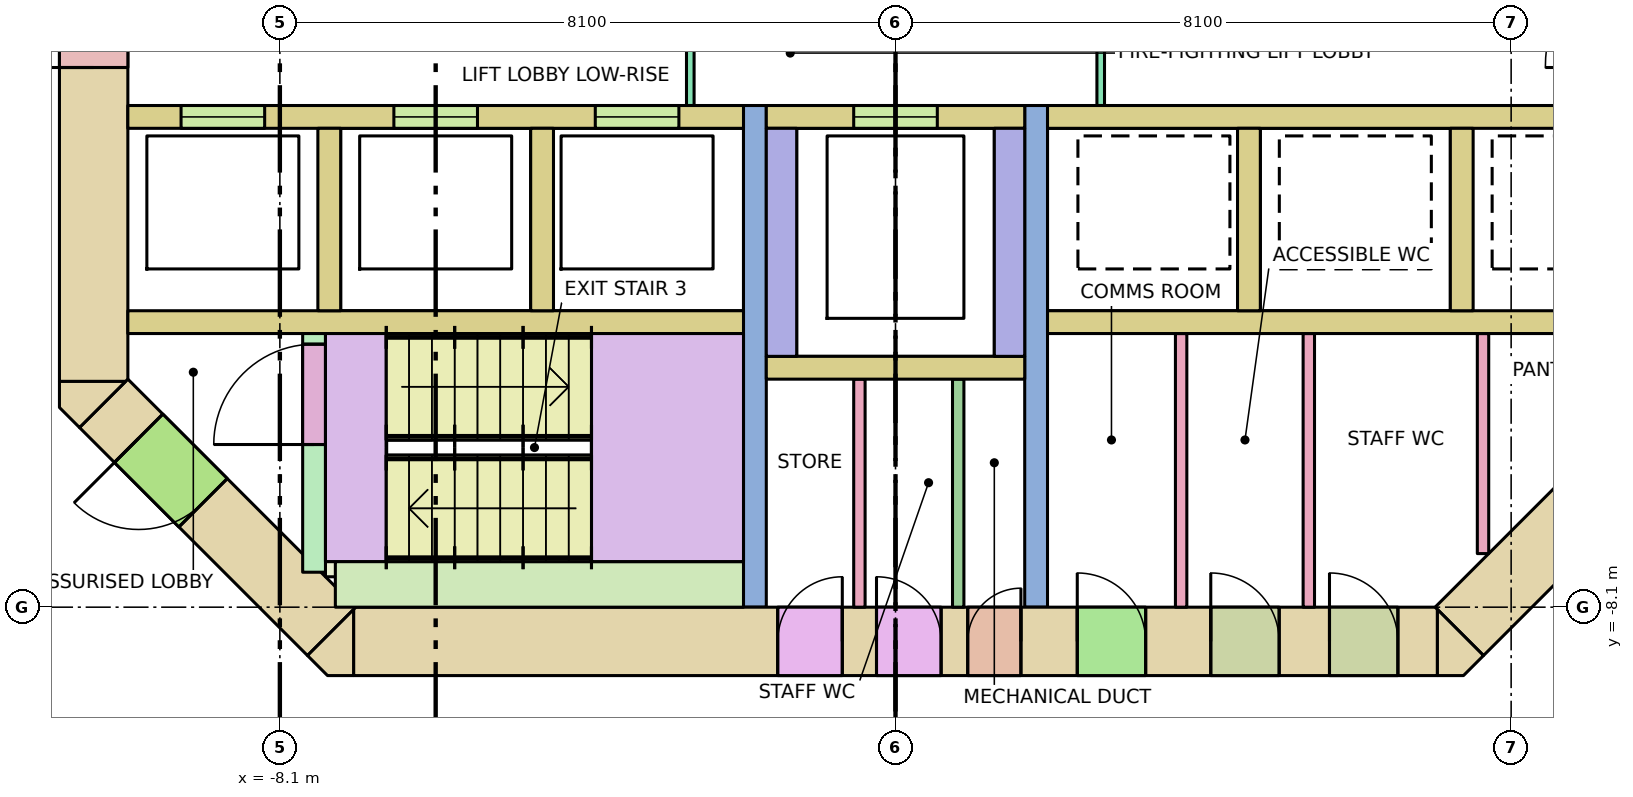
"""IFC4 building model, lengths in metres.
Left out: names, types, materials, properties, quantities, classifications, styles, units other than length and angle.
Written with IfcOpenShell. Run it as: python <this file> out.ifc"""

import sys

from ifc_helpers import new_model, si_unit, direction, frame, frame_2d, origin, place, context, subcontext, project, spatial, polyline, rectangle, outline, extrude, element, fill, save


model = new_model("IFC4")
c1 = context("Model", 3, precision=1e-05, world=origin(), true_north=direction((0.0, 1.0)))
c2 = subcontext(c1, "Body", "Model", "MODEL_VIEW")
j1 = project(units=[si_unit("LENGTHUNIT", "METRE"), si_unit("PLANEANGLEUNIT", "RADIAN")], contexts=[c1])
p1 = place(None, origin())
s1 = spatial("IfcSite", under=j1, at=p1, CompositionType="ELEMENT")
p2 = place(p1, origin())
s2 = spatial("IfcBuilding", under=s1, at=p2, CompositionType="ELEMENT")
p3 = place(p2, frame((0.0, 0.0, 20.0)))
s3 = spatial("IfcBuildingStorey", under=s2, at=p3, CompositionType="ELEMENT", Elevation=20.0)
p4 = place(p3, frame((-7.13, -8.55, -0.32), z_axis=(0.0, 0.0, 1.0), x_axis=(1.0, 0.0, 0.0)))
e1 = element("IfcWall", 1, at=p4, inside=s3, PredefinedType="SHEAR", context=c2, shape_type="SweptSolid", body=[
    extrude(rectangle(XDim=14.26, YDim=0.9, at=frame_2d((7.13, 0.0))), origin(), (0.0, 0.0, 1.0), 7.04),
])
p5 = place(p4, frame((8.08, 0.0, 0.32)))
e2 = element("IfcOpeningElement", 2, at=p5, cuts=e1, PredefinedType="OPENING", context=c2, shape_type="SweptSolid", body=[
    extrude(rectangle(XDim=0.7, YDim=2.1, at=frame_2d((0.35, 1.05))), frame((0.0, 0.46, 0.0), z_axis=(0.0, -1.0, 0.0), x_axis=(1.0, 0.0, 0.0)), (0.0, 0.0, 1.0), 0.92),
])
p6 = place(p4, frame((5.58, 0.0, 0.32)))
e3 = element("IfcOpeningElement", 3, at=p6, cuts=e1, PredefinedType="OPENING", context=c2, shape_type="SweptSolid", body=[
    extrude(rectangle(XDim=0.85, YDim=2.1, at=frame_2d((0.425, 1.05))), frame((0.0, 0.46, 0.0), z_axis=(0.0, -1.0, 0.0), x_axis=(1.0, 0.0, 0.0)), (0.0, 0.0, 1.0), 0.92),
])
p7 = place(p4, frame((6.88, 0.0, 0.32)))
e4 = element("IfcOpeningElement", 4, at=p7, cuts=e1, PredefinedType="OPENING", context=c2, shape_type="SweptSolid", body=[
    extrude(rectangle(XDim=0.85, YDim=2.1, at=frame_2d((0.425, 1.05))), frame((0.0, 0.46, 0.0), z_axis=(0.0, -1.0, 0.0), x_axis=(1.0, 0.0, 0.0)), (0.0, 0.0, 1.0), 0.92),
])
p8 = place(p4, frame((9.521, 0.0, 0.32)))
e5 = element("IfcOpeningElement", 5, at=p8, cuts=e1, PredefinedType="OPENING", context=c2, shape_type="SweptSolid", body=[
    extrude(rectangle(XDim=0.9, YDim=2.1, at=frame_2d((0.45, 1.05))), frame((0.0, 0.46, 0.0), z_axis=(0.0, -1.0, 0.0), x_axis=(1.0, 0.0, 0.0)), (0.0, 0.0, 1.0), 0.92),
])
p9 = place(p4, frame((11.278, 0.0, 0.32)))
e6 = element("IfcOpeningElement", 6, at=p9, cuts=e1, PredefinedType="OPENING", context=c2, shape_type="SweptSolid", body=[
    extrude(rectangle(XDim=0.9, YDim=2.1, at=frame_2d((0.45, 1.05))), frame((0.0, 0.46, 0.0), z_axis=(0.0, -1.0, 0.0), x_axis=(1.0, 0.0, 0.0)), (0.0, 0.0, 1.0), 0.92),
])
p10 = place(p4, frame((12.84, 0.0, 0.32)))
e7 = element("IfcOpeningElement", 7, at=p10, cuts=e1, PredefinedType="OPENING", context=c2, shape_type="SweptSolid", body=[
    extrude(rectangle(XDim=0.9, YDim=2.1, at=frame_2d((0.45, 1.05))), frame((0.0, 0.46, 0.0), z_axis=(0.0, -1.0, 0.0), x_axis=(1.0, 0.0, 0.0)), (0.0, 0.0, 1.0), 0.92),
])
p11 = place(p3, frame((-10.55, -5.13, -0.32), z_axis=(0.0, 0.0, 1.0), x_axis=(0.0, 1.0, 0.0)))
e8 = element("IfcWall", 8, at=p11, inside=s3, PredefinedType="SHEAR", context=c2, shape_type="SweptSolid", body=[
    extrude(rectangle(XDim=10.26, YDim=0.9, at=frame_2d((5.13, 0.0))), origin(), (0.0, 0.0, 1.0), 7.04),
])
p12 = place(p11, frame((4.13, 0.0, 0.32)))
e9 = element("IfcOpeningElement", 9, at=p12, cuts=e8, PredefinedType="OPENING", context=c2, shape_type="SweptSolid", body=[
    extrude(rectangle(XDim=2.0, YDim=2.1, at=frame_2d((1.0, 1.05))), frame((0.0, 0.46, 0.0), z_axis=(0.0, -1.0, 0.0), x_axis=(1.0, 0.0, 0.0)), (0.0, 0.0, 1.0), 0.92),
])
p13 = place(p3, frame((10.418, -5.418, -0.32), z_axis=(0.0, 0.0, 1.0), x_axis=(-0.707106781187, -0.707106781187, 0.0)))
e10 = element("IfcWall", 10, at=p13, inside=s3, PredefinedType="SHEAR", context=c2, shape_type="SweptSolid", body=[
    extrude(rectangle(XDim=4.243, YDim=0.9, at=frame_2d((2.121, 0.0))), origin(), (0.0, 0.0, 1.0), 7.04),
])
p14 = place(p13, frame((0.52, 0.0, 0.32)))
e11 = element("IfcOpeningElement", 11, at=p14, cuts=e10, PredefinedType="OPENING", context=c2, shape_type="SweptSolid", body=[
    extrude(rectangle(XDim=0.9, YDim=2.1, at=frame_2d((0.45, 1.05))), frame((0.0, 0.46, 0.0), z_axis=(0.0, -1.0, 0.0), x_axis=(1.0, 0.0, 0.0)), (0.0, 0.0, 1.0), 0.92),
])
p15 = place(p3, frame((-7.418, -8.418, -0.32), z_axis=(0.0, 0.0, 1.0), x_axis=(-0.707106781187, 0.707106781187, 0.0)))
e12 = element("IfcWall", 12, at=p15, inside=s3, PredefinedType="SHEAR", context=c2, shape_type="SweptSolid", body=[
    extrude(rectangle(XDim=4.243, YDim=0.9, at=frame_2d((2.121, 0.0))), origin(), (0.0, 0.0, 1.0), 7.04),
])
p16 = place(p15, frame((2.393, 0.0, 0.32)))
e13 = element("IfcOpeningElement", 13, at=p16, cuts=e12, PredefinedType="OPENING", context=c2, shape_type="SweptSolid", body=[
    extrude(rectangle(XDim=1.2, YDim=2.1, at=frame_2d((0.6, 1.05))), frame((0.0, 0.46, 0.0), z_axis=(0.0, -1.0, 0.0), x_axis=(1.0, 0.0, 0.0)), (0.0, 0.0, 1.0), 0.92),
])
p17 = place(p3, frame((0.0, 0.0, -0.32)))
e14 = element("IfcWall", 14, at=p17, inside=s3, PredefinedType="SHEAR", context=c2, shape_type="SweptSolid", body=[
    extrude(outline(polyline([(-7.473, -9.0), (-7.736, -8.736), (-7.13, -8.13), (-7.13, -9.0), (-7.473, -9.0)])), origin(), (0.0, 0.0, 1.0), 7.04),
])
p18 = place(p3, frame((0.0, 0.0, -0.32)))
e15 = element("IfcWall", 15, at=p18, inside=s3, PredefinedType="SHEAR", context=c2, shape_type="SweptSolid", body=[
    extrude(outline(polyline([(7.473, -9.0), (7.13, -9.0), (7.13, -8.13), (7.736, -8.736), (7.473, -9.0)])), origin(), (0.0, 0.0, 1.0), 7.04),
])
p19 = place(p3, frame((0.0, 0.0, -0.32)))
e16 = element("IfcWall", 16, at=p19, inside=s3, PredefinedType="SHEAR", context=c2, shape_type="SweptSolid", body=[
    extrude(outline(polyline([(-11.0, -5.473), (-11.0, -5.13), (-10.13, -5.13), (-10.736, -5.736), (-11.0, -5.473)])), origin(), (0.0, 0.0, 1.0), 7.04),
])
for number, where, z_axis, x_axis in (
    (17, (-10.1, -4.35, 0.0), (0.0, 0.0, 1.0), (1.0, 0.0, 0.0)),
    (18, (2.0, -4.35, 0.0), (0.0, 0.0, 1.0), (1.0, 0.0, 0.0)),
):
    element("IfcWall", number, at=place(p3, frame(where, z_axis=z_axis, x_axis=x_axis)), inside=s3, PredefinedType="SOLIDWALL", context=c2, shape_type="SweptSolid", body=[
        extrude(rectangle(XDim=8.1, YDim=0.3, at=frame_2d((4.05, 0.0))), origin(), (0.0, 0.0, 1.0), 6.72),
    ])
p20 = place(p3, frame((-10.1, -1.65, 0.0), z_axis=(0.0, 0.0, 1.0), x_axis=(1.0, 0.0, 0.0)))
e19 = element("IfcWall", 19, at=p20, inside=s3, PredefinedType="SOLIDWALL", context=c2, shape_type="SweptSolid", body=[
    extrude(rectangle(XDim=8.1, YDim=0.3, at=frame_2d((4.05, 0.0))), origin(), (0.0, 0.0, 1.0), 6.72),
])
p21 = place(p20, frame((0.7, 0.0, 0.0)))
e20 = element("IfcOpeningElement", 20, at=p21, cuts=e19, PredefinedType="OPENING", context=c2, shape_type="SweptSolid", body=[
    extrude(rectangle(XDim=1.1, YDim=2.1, at=frame_2d((0.55, 1.05))), frame((0.0, 0.16, 0.0), z_axis=(0.0, -1.0, 0.0), x_axis=(1.0, 0.0, 0.0)), (0.0, 0.0, 1.0), 0.32),
])
p22 = place(p20, frame((3.5, 0.0, 0.0)))
e21 = element("IfcOpeningElement", 21, at=p22, cuts=e19, PredefinedType="OPENING", context=c2, shape_type="SweptSolid", body=[
    extrude(rectangle(XDim=1.1, YDim=2.1, at=frame_2d((0.55, 1.05))), frame((0.0, 0.16, 0.0), z_axis=(0.0, -1.0, 0.0), x_axis=(1.0, 0.0, 0.0)), (0.0, 0.0, 1.0), 0.32),
])
p23 = place(p20, frame((6.15, 0.0, 0.0)))
e22 = element("IfcOpeningElement", 22, at=p23, cuts=e19, PredefinedType="OPENING", context=c2, shape_type="SweptSolid", body=[
    extrude(rectangle(XDim=1.1, YDim=2.1, at=frame_2d((0.55, 1.05))), frame((0.0, 0.16, 0.0), z_axis=(0.0, -1.0, 0.0), x_axis=(1.0, 0.0, 0.0)), (0.0, 0.0, 1.0), 0.32),
])
p24 = place(p3, frame((2.0, -1.65, 0.0), z_axis=(0.0, 0.0, 1.0), x_axis=(1.0, 0.0, 0.0)))
e23 = element("IfcWall", 23, at=p24, inside=s3, PredefinedType="SOLIDWALL", context=c2, shape_type="SweptSolid", body=[
    extrude(rectangle(XDim=8.1, YDim=0.3, at=frame_2d((4.05, 0.0))), origin(), (0.0, 0.0, 1.0), 6.72),
])
for number, where, z_axis, x_axis in (
    (24, (-7.45, -4.2, 0.0), (0.0, 0.0, 1.0), (0.0, 1.0, 0.0)),
    (25, (-4.65, -4.2, 0.0), (0.0, 0.0, 1.0), (0.0, 1.0, 0.0)),
    (26, (4.65, -4.2, 0.0), (0.0, 0.0, 1.0), (0.0, 1.0, 0.0)),
    (27, (7.45, -4.2, 0.0), (0.0, 0.0, 1.0), (0.0, 1.0, 0.0)),
):
    element("IfcWall", number, at=place(p3, frame(where, z_axis=z_axis, x_axis=x_axis)), inside=s3, PredefinedType="SOLIDWALL", context=c2, shape_type="SweptSolid", body=[
        extrude(rectangle(XDim=2.4, YDim=0.3, at=frame_2d((1.2, 0.0))), origin(), (0.0, 0.0, 1.0), 6.72),
    ])
for number, where, z_axis, x_axis in (
    (28, (-1.85, -8.1, 0.0), (0.0, 0.0, 1.0), (0.0, 1.0, 0.0)),
    (29, (1.85, -8.1, 0.0), (0.0, 0.0, 1.0), (0.0, 1.0, 0.0)),
):
    element("IfcWall", number, at=place(p3, frame(where, z_axis=z_axis, x_axis=x_axis)), inside=s3, PredefinedType="SHEAR", context=c2, shape_type="SweptSolid", body=[
        extrude(rectangle(XDim=6.6, YDim=0.3, at=frame_2d((3.3, 0.0))), origin(), (0.0, 0.0, 1.0), 6.72),
    ])
p25 = place(p3, frame((-1.7, -1.65, 0.0), z_axis=(0.0, 0.0, 1.0), x_axis=(1.0, 0.0, 0.0)))
e30 = element("IfcWall", 30, at=p25, inside=s3, PredefinedType="SOLIDWALL", context=c2, shape_type="SweptSolid", body=[
    extrude(rectangle(XDim=3.4, YDim=0.3, at=frame_2d((1.7, 0.0))), origin(), (0.0, 0.0, 1.0), 6.72),
])
p26 = place(p25, frame((1.15, 0.0, 0.0)))
e31 = element("IfcOpeningElement", 31, at=p26, cuts=e30, PredefinedType="OPENING", context=c2, shape_type="SweptSolid", body=[
    extrude(rectangle(XDim=1.1, YDim=2.1, at=frame_2d((0.55, 1.05))), frame((0.0, 0.16, 0.0), z_axis=(0.0, -1.0, 0.0), x_axis=(1.0, 0.0, 0.0)), (0.0, 0.0, 1.0), 0.32),
])
for number, where, z_axis, x_axis in (
    (32, (-1.5, -4.8, 0.0), (0.0, 0.0, 1.0), (0.0, 1.0, 0.0)),
    (33, (1.5, -4.8, 0.0), (0.0, 0.0, 1.0), (0.0, 1.0, 0.0)),
):
    element("IfcWall", number, at=place(p3, frame(where, z_axis=z_axis, x_axis=x_axis)), inside=s3, PredefinedType="SOLIDWALL", context=c2, shape_type="SweptSolid", body=[
        extrude(rectangle(XDim=3.0, YDim=0.4, at=frame_2d((1.5, 0.0))), origin(), (0.0, 0.0, 1.0), 6.72),
    ])
p27 = place(p3, frame((-1.7, -4.95, 0.0), z_axis=(0.0, 0.0, 1.0), x_axis=(1.0, 0.0, 0.0)))
e34 = element("IfcWall", 34, at=p27, inside=s3, PredefinedType="SOLIDWALL", context=c2, shape_type="SweptSolid", body=[
    extrude(rectangle(XDim=3.4, YDim=0.3, at=frame_2d((1.7, 0.0))), origin(), (0.0, 0.0, 1.0), 6.72),
])
p28 = place(p3, frame((-7.65, -7.64, 0.0), z_axis=(0.0, 0.0, 1.0), x_axis=(0.0, 1.0, 0.0)))
e35 = element("IfcWall", 35, at=p28, inside=s3, PredefinedType="SHEAR", context=c2, shape_type="SweptSolid", body=[
    extrude(rectangle(XDim=3.14, YDim=0.3, at=frame_2d((1.57, 0.0))), origin(), (0.0, 0.0, 1.0), 6.72),
])
p29 = place(p28, frame((1.68, 0.0, 0.0)))
e36 = element("IfcOpeningElement", 36, at=p29, cuts=e35, PredefinedType="OPENING", context=c2, shape_type="SweptSolid", body=[
    extrude(rectangle(XDim=1.32, YDim=2.1, at=frame_2d((0.66, 1.05))), frame((0.0, 0.16, 0.0), z_axis=(0.0, -1.0, 0.0), x_axis=(1.0, 0.0, 0.0)), (0.0, 0.0, 1.0), 0.32),
])
p30 = place(p3, frame((-7.5, -7.6, 0.0), z_axis=(0.0, 0.0, 1.0), x_axis=(1.0, 0.0, 0.0)))
e37 = element("IfcWall", 37, at=p30, inside=s3, PredefinedType="SHEAR", context=c2, shape_type="SweptSolid", body=[
    extrude(rectangle(XDim=0.6, YDim=0.2, at=frame_2d((0.3, 0.0))), origin(), (0.0, 0.0, 1.0), 6.72),
])
p31 = place(p3, frame((-7.37, -7.8, 0.0), z_axis=(0.0, 0.0, 1.0), x_axis=(1.0, 0.0, 0.0)))
e38 = element("IfcWall", 38, at=p31, inside=s3, PredefinedType="SHEAR", context=c2, shape_type="SweptSolid", body=[
    extrude(rectangle(XDim=5.37, YDim=0.6, at=frame_2d((2.685, 0.0))), origin(), (0.0, 0.0, 1.0), 6.72),
])
p32 = place(p3, frame((-2.7, -1.5, 0.0), z_axis=(0.0, 0.0, 1.0), x_axis=(0.0, 1.0, 0.0)))
e39 = element("IfcWall", 39, at=p32, inside=s3, PredefinedType="PARTITIONING", context=c2, shape_type="SweptSolid", body=[
    extrude(rectangle(XDim=3.0, YDim=0.1, at=frame_2d((1.5, 0.0))), origin(), (0.0, 0.0, 1.0), 6.72),
])
p33 = place(p32, frame((0.9, 0.0, 0.0)))
e40 = element("IfcOpeningElement", 40, at=p33, cuts=e39, PredefinedType="OPENING", context=c2, shape_type="SweptSolid", body=[
    extrude(rectangle(XDim=1.2, YDim=2.1, at=frame_2d((0.6, 1.05))), frame((0.0, 0.06, 0.0), z_axis=(0.0, -1.0, 0.0), x_axis=(1.0, 0.0, 0.0)), (0.0, 0.0, 1.0), 0.12),
])
p34 = place(p3, frame((2.7, -1.5, 0.0), z_axis=(0.0, 0.0, 1.0), x_axis=(0.0, 1.0, 0.0)))
e41 = element("IfcWall", 41, at=p34, inside=s3, PredefinedType="PARTITIONING", context=c2, shape_type="SweptSolid", body=[
    extrude(rectangle(XDim=3.0, YDim=0.1, at=frame_2d((1.5, 0.0))), origin(), (0.0, 0.0, 1.0), 6.72),
])
p35 = place(p34, frame((0.9, 0.0, 0.0)))
e42 = element("IfcOpeningElement", 42, at=p35, cuts=e41, PredefinedType="OPENING", context=c2, shape_type="SweptSolid", body=[
    extrude(rectangle(XDim=1.2, YDim=2.1, at=frame_2d((0.6, 1.05))), frame((0.0, 0.06, 0.0), z_axis=(0.0, -1.0, 0.0), x_axis=(1.0, 0.0, 0.0)), (0.0, 0.0, 1.0), 0.12),
])
for number, where, z_axis, x_axis in (
    (43, (0.825, -8.1, 0.0), (0.0, 0.0, 1.0), (0.0, 1.0, 0.0)),
    (44, (-0.475, -8.1, 0.0), (0.0, 0.0, 1.0), (0.0, 1.0, 0.0)),
):
    element("IfcWall", number, at=place(p3, frame(where, z_axis=z_axis, x_axis=x_axis)), inside=s3, PredefinedType="PARTITIONING", context=c2, shape_type="SweptSolid", body=[
        extrude(rectangle(XDim=3.0, YDim=0.15, at=frame_2d((1.5, 0.0))), origin(), (0.0, 0.0, 1.0), 6.72),
    ])
for number, where, z_axis, x_axis in (
    (45, (3.758, -8.1, 0.0), (0.0, 0.0, 1.0), (0.0, 1.0, 0.0)),
    (46, (5.438, -8.1, 0.0), (0.0, 0.0, 1.0), (0.0, 1.0, 0.0)),
):
    element("IfcWall", number, at=place(p3, frame(where, z_axis=z_axis, x_axis=x_axis)), inside=s3, PredefinedType="PARTITIONING", context=c2, shape_type="SweptSolid", body=[
        extrude(rectangle(XDim=3.6, YDim=0.15, at=frame_2d((1.8, 0.0))), origin(), (0.0, 0.0, 1.0), 6.72),
    ])
p36 = place(p3, frame((7.73, -7.395, 0.0), z_axis=(0.0, 0.0, 1.0), x_axis=(0.0, 1.0, 0.0)))
e47 = element("IfcWall", 47, at=p36, inside=s3, PredefinedType="PARTITIONING", context=c2, shape_type="SweptSolid", body=[
    extrude(rectangle(XDim=2.895, YDim=0.15, at=frame_2d((1.448, 0.0))), origin(), (0.0, 0.0, 1.0), 6.72),
])
p37 = place(p21, origin())
e48 = element("IfcDoor", 48, at=p37, inside=s3, OperationType="DOUBLE_DOOR_SLIDING", PredefinedType="DOOR", context=c2, shape_type="SweptSolid", body=[
    extrude(rectangle(XDim=1.1, YDim=2.1, at=frame_2d((0.55, 1.05))), frame((0.0, 0.025, 0.0), z_axis=(0.0, -1.0, 0.0), x_axis=(1.0, 0.0, 0.0)), (0.0, 0.0, 1.0), 0.05),
])
fill(e20, e48)
p38 = place(p22, origin())
e49 = element("IfcDoor", 49, at=p38, inside=s3, OperationType="DOUBLE_DOOR_SLIDING", PredefinedType="DOOR", context=c2, shape_type="SweptSolid", body=[
    extrude(rectangle(XDim=1.1, YDim=2.1, at=frame_2d((0.55, 1.05))), frame((0.0, 0.025, 0.0), z_axis=(0.0, -1.0, 0.0), x_axis=(1.0, 0.0, 0.0)), (0.0, 0.0, 1.0), 0.05),
])
fill(e21, e49)
p39 = place(p23, origin())
e50 = element("IfcDoor", 50, at=p39, inside=s3, OperationType="DOUBLE_DOOR_SLIDING", PredefinedType="DOOR", context=c2, shape_type="SweptSolid", body=[
    extrude(rectangle(XDim=1.1, YDim=2.1, at=frame_2d((0.55, 1.05))), frame((0.0, 0.025, 0.0), z_axis=(0.0, -1.0, 0.0), x_axis=(1.0, 0.0, 0.0)), (0.0, 0.0, 1.0), 0.05),
])
fill(e22, e50)
p40 = place(p26, origin())
e51 = element("IfcDoor", 51, at=p40, inside=s3, OperationType="DOUBLE_DOOR_SLIDING", PredefinedType="DOOR", context=c2, shape_type="SweptSolid", body=[
    extrude(rectangle(XDim=1.1, YDim=2.1, at=frame_2d((0.55, 1.05))), frame((0.0, 0.025, 0.0), z_axis=(0.0, -1.0, 0.0), x_axis=(1.0, 0.0, 0.0)), (0.0, 0.0, 1.0), 0.05),
])
fill(e31, e51)
p41 = place(p29, origin())
e52 = element("IfcDoor", 52, at=p41, inside=s3, OperationType="DOUBLE_DOOR_SINGLE_SWING", PredefinedType="DOOR", context=c2, shape_type="SweptSolid", body=[
    extrude(rectangle(XDim=1.32, YDim=2.1, at=frame_2d((0.66, 1.05))), frame((0.0, 0.025, 0.0), z_axis=(0.0, -1.0, 0.0), x_axis=(1.0, 0.0, 0.0)), (0.0, 0.0, 1.0), 0.05),
])
fill(e36, e52)
p42 = place(p16, origin())
e53 = element("IfcDoor", 53, at=p42, inside=s3, OperationType="SINGLE_SWING_RIGHT", PredefinedType="DOOR", context=c2, shape_type="SweptSolid", body=[
    extrude(rectangle(XDim=1.2, YDim=2.1, at=frame_2d((0.6, 1.05))), frame((0.0, 0.025, 0.0), z_axis=(0.0, -1.0, 0.0), x_axis=(1.0, 0.0, 0.0)), (0.0, 0.0, 1.0), 0.05),
])
fill(e13, e53)
p43 = place(p12, origin())
e54 = element("IfcDoor", 54, at=p43, inside=s3, OperationType="DOUBLE_DOOR_SINGLE_SWING", PredefinedType="DOOR", context=c2, shape_type="SweptSolid", body=[
    extrude(rectangle(XDim=2.0, YDim=2.1, at=frame_2d((1.0, 1.05))), frame((0.0, 0.025, 0.0), z_axis=(0.0, -1.0, 0.0), x_axis=(1.0, 0.0, 0.0)), (0.0, 0.0, 1.0), 0.05),
])
fill(e9, e54)
p44 = place(p5, origin())
e55 = element("IfcDoor", 55, at=p44, inside=s3, OperationType="SINGLE_SWING_RIGHT", PredefinedType="DOOR", context=c2, shape_type="SweptSolid", body=[
    extrude(rectangle(XDim=0.7, YDim=2.1, at=frame_2d((0.35, 1.05))), frame((0.0, 0.025, 0.0), z_axis=(0.0, -1.0, 0.0), x_axis=(1.0, 0.0, 0.0)), (0.0, 0.0, 1.0), 0.05),
])
fill(e2, e55)
p45 = place(p6, origin())
e56 = element("IfcDoor", 56, at=p45, inside=s3, OperationType="SINGLE_SWING_RIGHT", PredefinedType="DOOR", context=c2, shape_type="SweptSolid", body=[
    extrude(rectangle(XDim=0.85, YDim=2.1, at=frame_2d((0.425, 1.05))), frame((0.0, 0.025, 0.0), z_axis=(0.0, -1.0, 0.0), x_axis=(1.0, 0.0, 0.0)), (0.0, 0.0, 1.0), 0.05),
])
fill(e3, e56)
p46 = place(p7, origin())
e57 = element("IfcDoor", 57, at=p46, inside=s3, OperationType="SINGLE_SWING_LEFT", PredefinedType="DOOR", context=c2, shape_type="SweptSolid", body=[
    extrude(rectangle(XDim=0.85, YDim=2.1, at=frame_2d((0.425, 1.05))), frame((0.0, 0.025, 0.0), z_axis=(0.0, -1.0, 0.0), x_axis=(1.0, 0.0, 0.0)), (0.0, 0.0, 1.0), 0.05),
])
fill(e4, e57)
p47 = place(p8, origin())
e58 = element("IfcDoor", 58, at=p47, inside=s3, OperationType="SINGLE_SWING_LEFT", PredefinedType="DOOR", context=c2, shape_type="SweptSolid", body=[
    extrude(rectangle(XDim=0.9, YDim=2.1, at=frame_2d((0.45, 1.05))), frame((0.0, 0.025, 0.0), z_axis=(0.0, -1.0, 0.0), x_axis=(1.0, 0.0, 0.0)), (0.0, 0.0, 1.0), 0.05),
])
fill(e5, e58)
p48 = place(p9, origin())
e59 = element("IfcDoor", 59, at=p48, inside=s3, OperationType="SINGLE_SWING_LEFT", PredefinedType="DOOR", context=c2, shape_type="SweptSolid", body=[
    extrude(rectangle(XDim=0.9, YDim=2.1, at=frame_2d((0.45, 1.05))), frame((0.0, 0.025, 0.0), z_axis=(0.0, -1.0, 0.0), x_axis=(1.0, 0.0, 0.0)), (0.0, 0.0, 1.0), 0.05),
])
fill(e6, e59)
p49 = place(p10, origin())
e60 = element("IfcDoor", 60, at=p49, inside=s3, OperationType="SINGLE_SWING_LEFT", PredefinedType="DOOR", context=c2, shape_type="SweptSolid", body=[
    extrude(rectangle(XDim=0.9, YDim=2.1, at=frame_2d((0.45, 1.05))), frame((0.0, 0.025, 0.0), z_axis=(0.0, -1.0, 0.0), x_axis=(1.0, 0.0, 0.0)), (0.0, 0.0, 1.0), 0.05),
])
fill(e7, e60)
save(model, sys.argv[1])
